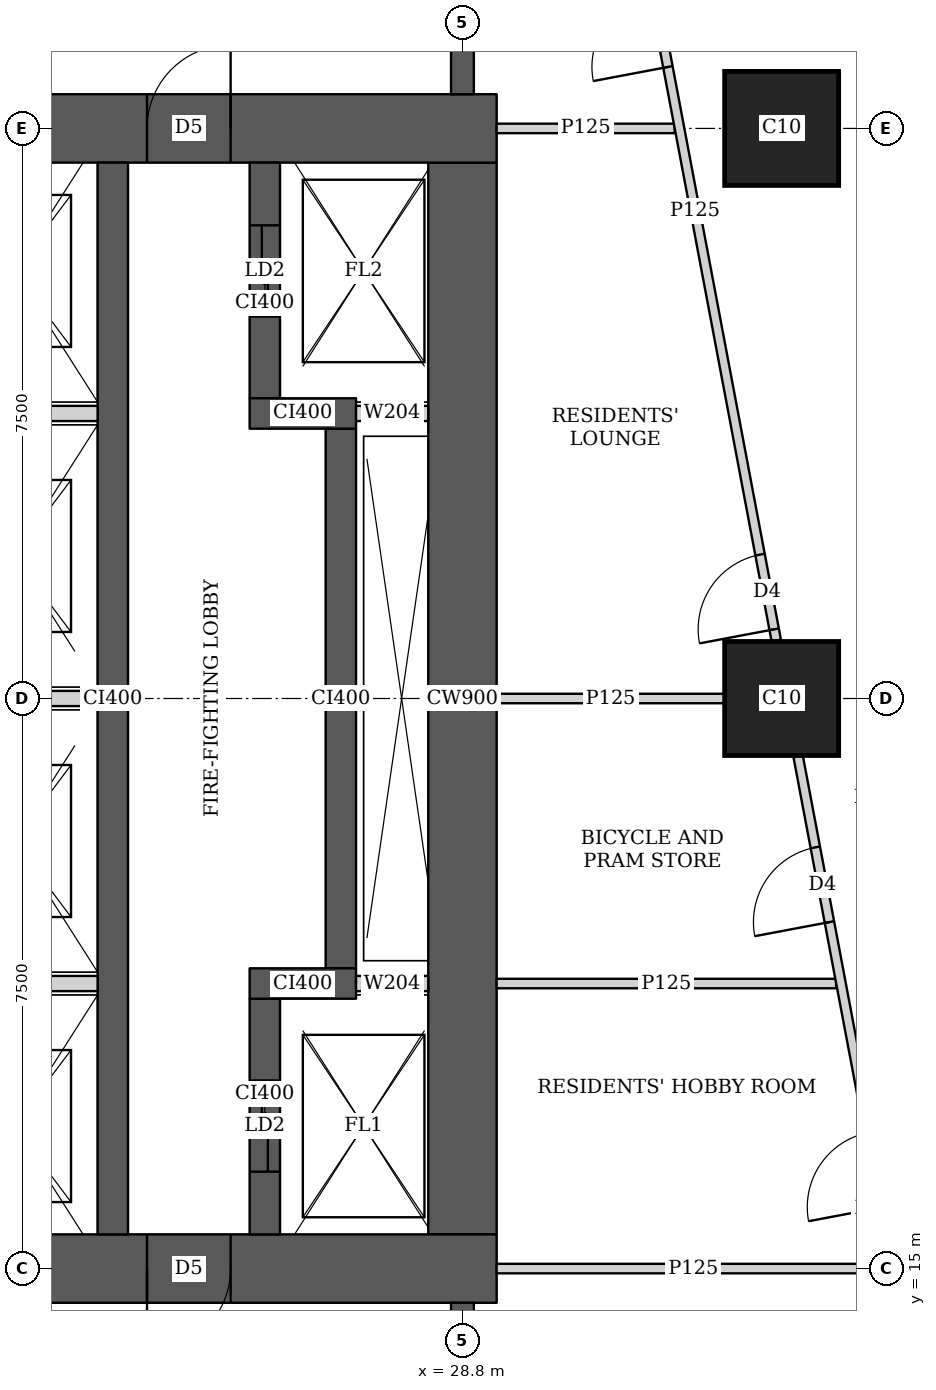
"""IFC4 building model, lengths in metres.
Left out: names, types, materials, properties, quantities, classifications, styles, units other than length and angle.
Written with IfcOpenShell. Run it as: python <this file> out.ifc"""

import sys

from ifc_helpers import new_model, si_unit, direction, frame, frame_2d, origin, origin_2d, place, context, subcontext, project, spatial, rectangle, extrude, element, fill, save


model = new_model("IFC4")
c1 = context("Model", 3, precision=1e-05, world=origin(), true_north=direction((0.0, 1.0)))
c2 = subcontext(c1, "Body", "Model", "MODEL_VIEW")
j1 = project(units=[si_unit("LENGTHUNIT", "METRE"), si_unit("PLANEANGLEUNIT", "RADIAN")], contexts=[c1])
p1 = place(None, origin())
s1 = spatial("IfcSite", under=j1, at=p1, CompositionType="ELEMENT")
p2 = place(p1, origin())
s2 = spatial("IfcBuilding", under=s1, at=p2, CompositionType="ELEMENT")
p3 = place(p2, frame((0.0, 0.0, 139.55)))
s3 = spatial("IfcBuildingStorey", under=s2, at=p3, CompositionType="ELEMENT", Elevation=139.55)
for number, where, z_axis, x_axis in (
    (1, (33.0, 22.5, 0.0), (0.0, 0.0, 1.0), (1.0, 0.0, 0.0)),
    (2, (33.0, 30.0, 0.0), (0.0, 0.0, 1.0), (1.0, 0.0, 0.0)),
):
    element("IfcColumn", number, at=place(p3, frame(where, z_axis=z_axis, x_axis=x_axis)), inside=s3, PredefinedType="COLUMN", context=c2, shape_type="SweptSolid", body=[
        extrude(rectangle(XDim=1.5, YDim=1.5, at=origin_2d()), origin(), (0.0, 0.0, 1.0), 3.75),
    ])
p4 = place(p3, frame((13.95, 15.0, 0.0), z_axis=(0.0, 0.0, 1.0), x_axis=(1.0, 0.0, 0.0)))
e3 = element("IfcWall", 3, at=p4, inside=s3, PredefinedType="SHEAR", context=c2, shape_type="SweptSolid", body=[
    extrude(rectangle(XDim=15.3, YDim=0.9, at=frame_2d((7.65, 0.0))), origin(), (0.0, 0.0, 1.0), 3.75),
])
p5 = place(p4, frame((4.45, 0.0, 0.0)))
e4 = element("IfcOpeningElement", 4, at=p5, cuts=e3, PredefinedType="OPENING", context=c2, shape_type="SweptSolid", body=[
    extrude(rectangle(XDim=1.8, YDim=2.1, at=frame_2d((0.9, 1.05))), frame((0.0, 0.46, 0.0), z_axis=(0.0, -1.0, 0.0), x_axis=(1.0, 0.0, 0.0)), (0.0, 0.0, 1.0), 0.92),
])
p6 = place(p4, frame((10.7, 0.0, 0.0)))
e5 = element("IfcOpeningElement", 5, at=p6, cuts=e3, PredefinedType="OPENING", context=c2, shape_type="SweptSolid", body=[
    extrude(rectangle(XDim=1.1, YDim=2.1, at=frame_2d((0.55, 1.05))), frame((0.0, 0.46, 0.0), z_axis=(0.0, -1.0, 0.0), x_axis=(1.0, 0.0, 0.0)), (0.0, 0.0, 1.0), 0.92),
])
p7 = place(p3, frame((13.95, 30.0, 0.0), z_axis=(0.0, 0.0, 1.0), x_axis=(1.0, 0.0, 0.0)))
e6 = element("IfcWall", 6, at=p7, inside=s3, PredefinedType="SHEAR", context=c2, shape_type="SweptSolid", body=[
    extrude(rectangle(XDim=15.3, YDim=0.9, at=frame_2d((7.65, 0.0))), origin(), (0.0, 0.0, 1.0), 3.75),
])
p8 = place(p7, frame((4.45, 0.0, 0.0)))
e7 = element("IfcOpeningElement", 7, at=p8, cuts=e6, PredefinedType="OPENING", context=c2, shape_type="SweptSolid", body=[
    extrude(rectangle(XDim=1.8, YDim=2.1, at=frame_2d((0.9, 1.05))), frame((0.0, 0.46, 0.0), z_axis=(0.0, -1.0, 0.0), x_axis=(1.0, 0.0, 0.0)), (0.0, 0.0, 1.0), 0.92),
])
p9 = place(p7, frame((10.7, 0.0, 0.0)))
e8 = element("IfcOpeningElement", 8, at=p9, cuts=e6, PredefinedType="OPENING", context=c2, shape_type="SweptSolid", body=[
    extrude(rectangle(XDim=1.1, YDim=2.1, at=frame_2d((0.55, 1.05))), frame((0.0, 0.46, 0.0), z_axis=(0.0, -1.0, 0.0), x_axis=(1.0, 0.0, 0.0)), (0.0, 0.0, 1.0), 0.92),
])
p10 = place(p3, frame((28.8, 15.45, 0.0), z_axis=(0.0, 0.0, 1.0), x_axis=(0.0, 1.0, 0.0)))
e9 = element("IfcWall", 9, at=p10, inside=s3, PredefinedType="SHEAR", context=c2, shape_type="SweptSolid", body=[
    extrude(rectangle(XDim=14.1, YDim=0.9, at=frame_2d((7.05, 0.0))), origin(), (0.0, 0.0, 1.0), 3.75),
])
p11 = place(p3, frame((24.2, 15.45, 0.0), z_axis=(0.0, 0.0, 1.0), x_axis=(0.0, 1.0, 0.0)))
e10 = element("IfcWall", 10, at=p11, inside=s3, PredefinedType="SHEAR", context=c2, shape_type="SweptSolid", body=[
    extrude(rectangle(XDim=14.1, YDim=0.4, at=frame_2d((7.05, 0.0))), origin(), (0.0, 0.0, 1.0), 3.75),
])
p12 = place(p3, frame((26.2, 15.45, 0.0), z_axis=(0.0, 0.0, 1.0), x_axis=(0.0, 1.0, 0.0)))
e11 = element("IfcWall", 11, at=p12, inside=s3, PredefinedType="SHEAR", context=c2, shape_type="SweptSolid", body=[
    extrude(rectangle(XDim=3.1, YDim=0.4, at=frame_2d((1.55, 0.0))), origin(), (0.0, 0.0, 1.0), 3.75),
])
p13 = place(p12, frame((0.825, 0.0, 0.0)))
e12 = element("IfcOpeningElement", 12, at=p13, cuts=e11, PredefinedType="OPENING", context=c2, shape_type="SweptSolid", body=[
    extrude(rectangle(XDim=1.2, YDim=2.1, at=frame_2d((0.6, 1.05))), frame((0.0, 0.21, 0.0), z_axis=(0.0, -1.0, 0.0), x_axis=(1.0, 0.0, 0.0)), (0.0, 0.0, 1.0), 0.42),
])
p14 = place(p3, frame((26.0, 18.75, 0.0), z_axis=(0.0, 0.0, 1.0), x_axis=(1.0, 0.0, 0.0)))
e13 = element("IfcWall", 13, at=p14, inside=s3, PredefinedType="SHEAR", context=c2, shape_type="SweptSolid", body=[
    extrude(rectangle(XDim=1.4, YDim=0.4, at=frame_2d((0.7, 0.0))), origin(), (0.0, 0.0, 1.0), 3.75),
])
p15 = place(p3, frame((27.2, 18.95, 0.0), z_axis=(0.0, 0.0, 1.0), x_axis=(0.0, 1.0, 0.0)))
e14 = element("IfcWall", 14, at=p15, inside=s3, PredefinedType="SHEAR", context=c2, shape_type="SweptSolid", body=[
    extrude(rectangle(XDim=7.1, YDim=0.4, at=frame_2d((3.55, 0.0))), origin(), (0.0, 0.0, 1.0), 3.75),
])
p16 = place(p3, frame((26.0, 26.25, 0.0), z_axis=(0.0, 0.0, 1.0), x_axis=(1.0, 0.0, 0.0)))
e15 = element("IfcWall", 15, at=p16, inside=s3, PredefinedType="SHEAR", context=c2, shape_type="SweptSolid", body=[
    extrude(rectangle(XDim=1.4, YDim=0.4, at=frame_2d((0.7, 0.0))), origin(), (0.0, 0.0, 1.0), 3.75),
])
p17 = place(p3, frame((26.2, 26.45, 0.0), z_axis=(0.0, 0.0, 1.0), x_axis=(0.0, 1.0, 0.0)))
e16 = element("IfcWall", 16, at=p17, inside=s3, PredefinedType="SHEAR", context=c2, shape_type="SweptSolid", body=[
    extrude(rectangle(XDim=3.1, YDim=0.4, at=frame_2d((1.55, 0.0))), origin(), (0.0, 0.0, 1.0), 3.75),
])
p18 = place(p17, frame((1.075, 0.0, 0.0)))
e17 = element("IfcOpeningElement", 17, at=p18, cuts=e16, PredefinedType="OPENING", context=c2, shape_type="SweptSolid", body=[
    extrude(rectangle(XDim=1.2, YDim=2.1, at=frame_2d((0.6, 1.05))), frame((0.0, 0.21, 0.0), z_axis=(0.0, -1.0, 0.0), x_axis=(1.0, 0.0, 0.0)), (0.0, 0.0, 1.0), 0.42),
])
for number, where, z_axis, x_axis in (
    (18, (28.8, 10.35, 0.0), (0.0, 0.0, 1.0), (0.0, 1.0, 0.0)),
    (19, (28.8, 30.45, 0.0), (0.0, 0.0, 1.0), (0.0, 1.0, 0.0)),
):
    element("IfcWall", number, at=place(p3, frame(where, z_axis=z_axis, x_axis=x_axis)), inside=s3, PredefinedType="SHEAR", context=c2, shape_type="SweptSolid", body=[
        extrude(rectangle(XDim=4.2, YDim=0.3, at=frame_2d((2.1, 0.0))), origin(), (0.0, 0.0, 1.0), 3.75),
    ])
p19 = place(p3, frame((33.623, 43.022, 0.0), z_axis=(0.0, 0.0, 1.0), x_axis=(0.185596841028, -0.98262597798, 0.0)))
e20 = element("IfcWall", 20, at=p19, inside=s3, PredefinedType="SOLIDWALL", context=c2, shape_type="SweptSolid", body=[
    extrude(rectangle(XDim=41.66, YDim=0.15, at=frame_2d((20.83, 0.0))), origin(), (0.0, 0.0, 1.0), 2.5),
])
p20 = place(p19, frame((20.242, 0.0, 0.0)))
e21 = element("IfcOpeningElement", 21, at=p20, cuts=e20, PredefinedType="OPENING", context=c2, shape_type="SweptSolid", body=[
    extrude(rectangle(XDim=1.0, YDim=2.1, at=frame_2d((0.5, 1.05))), frame((0.0, 0.085, 0.0), z_axis=(0.0, -1.0, 0.0), x_axis=(1.0, 0.0, 0.0)), (0.0, 0.0, 1.0), 0.17),
])
p21 = place(p19, frame((24.714, 0.0, 0.0)))
e22 = element("IfcOpeningElement", 22, at=p21, cuts=e20, PredefinedType="OPENING", context=c2, shape_type="SweptSolid", body=[
    extrude(rectangle(XDim=1.0, YDim=2.1, at=frame_2d((0.5, 1.05))), frame((0.0, 0.085, 0.0), z_axis=(0.0, -1.0, 0.0), x_axis=(1.0, 0.0, 0.0)), (0.0, 0.0, 1.0), 0.17),
])
p22 = place(p19, frame((31.206, 0.0, 0.0)))
e23 = element("IfcOpeningElement", 23, at=p22, cuts=e20, PredefinedType="OPENING", context=c2, shape_type="SweptSolid", body=[
    extrude(rectangle(XDim=1.0, YDim=2.1, at=frame_2d((0.5, 1.05))), frame((0.0, 0.085, 0.0), z_axis=(0.0, -1.0, 0.0), x_axis=(1.0, 0.0, 0.0)), (0.0, 0.0, 1.0), 0.17),
])
p23 = place(p3, frame((35.354, 10.424, 0.0), z_axis=(0.0, 0.0, 1.0), x_axis=(-0.185612234763, 0.982623070311, 0.0)))
e24 = element("IfcWall", 24, at=p23, inside=s3, PredefinedType="PARTITIONING", context=c2, shape_type="SweptSolid", body=[
    extrude(rectangle(XDim=11.513, YDim=0.125, at=frame_2d((5.756, 0.0))), origin(), (0.0, 0.0, 1.0), 3.5),
])
p24 = place(p23, frame((0.697, 0.0, 0.0)))
e25 = element("IfcOpeningElement", 25, at=p24, cuts=e24, PredefinedType="OPENING", context=c2, shape_type="SweptSolid", body=[
    extrude(rectangle(XDim=1.0, YDim=2.1, at=frame_2d((0.5, 1.05))), frame((0.0, 0.073, 0.0), z_axis=(0.0, -1.0, 0.0), x_axis=(1.0, 0.0, 0.0)), (0.0, 0.0, 1.0), 0.145),
])
p25 = place(p23, frame((5.48, 0.0, 0.0)))
e26 = element("IfcOpeningElement", 26, at=p25, cuts=e24, PredefinedType="OPENING", context=c2, shape_type="SweptSolid", body=[
    extrude(rectangle(XDim=1.0, YDim=2.1, at=frame_2d((0.5, 1.05))), frame((0.0, 0.073, 0.0), z_axis=(0.0, -1.0, 0.0), x_axis=(1.0, 0.0, 0.0)), (0.0, 0.0, 1.0), 0.145),
])
p26 = place(p23, frame((9.296, 0.0, 0.0)))
e27 = element("IfcOpeningElement", 27, at=p26, cuts=e24, PredefinedType="OPENING", context=c2, shape_type="SweptSolid", body=[
    extrude(rectangle(XDim=1.0, YDim=2.1, at=frame_2d((0.5, 1.05))), frame((0.0, 0.073, 0.0), z_axis=(0.0, -1.0, 0.0), x_axis=(1.0, 0.0, 0.0)), (0.0, 0.0, 1.0), 0.145),
])
p27 = place(p3, frame((32.929, 23.263, 0.0), z_axis=(0.0, 0.0, 1.0), x_axis=(-0.185612234763, 0.982623070311, 0.0)))
e28 = element("IfcWall", 28, at=p27, inside=s3, PredefinedType="PARTITIONING", context=c2, shape_type="SweptSolid", body=[
    extrude(rectangle(XDim=11.513, YDim=0.125, at=frame_2d((5.756, 0.0))), origin(), (0.0, 0.0, 1.0), 3.5),
])
p28 = place(p27, frame((0.15, 0.0, 0.0)))
e29 = element("IfcOpeningElement", 29, at=p28, cuts=e28, PredefinedType="OPENING", context=c2, shape_type="SweptSolid", body=[
    extrude(rectangle(XDim=1.0, YDim=2.1, at=frame_2d((0.5, 1.05))), frame((0.0, 0.073, 0.0), z_axis=(0.0, -1.0, 0.0), x_axis=(1.0, 0.0, 0.0)), (0.0, 0.0, 1.0), 0.145),
])
p29 = place(p27, frame((7.679, 0.0, 0.0)))
e30 = element("IfcOpeningElement", 30, at=p29, cuts=e28, PredefinedType="OPENING", context=c2, shape_type="SweptSolid", body=[
    extrude(rectangle(XDim=1.0, YDim=2.1, at=frame_2d((0.5, 1.05))), frame((0.0, 0.073, 0.0), z_axis=(0.0, -1.0, 0.0), x_axis=(1.0, 0.0, 0.0)), (0.0, 0.0, 1.0), 0.145),
])
p30 = place(p3, frame((29.25, 15.0, 0.0), z_axis=(0.0, 0.0, 1.0), x_axis=(1.0, 0.0, 0.0)))
e31 = element("IfcWall", 31, at=p30, inside=s3, PredefinedType="PARTITIONING", context=c2, shape_type="SweptSolid", body=[
    extrude(rectangle(XDim=5.176, YDim=0.125, at=frame_2d((2.588, 0.0))), origin(), (0.0, 0.0, 1.0), 3.5),
])
p31 = place(p3, frame((29.25, 18.75, 0.0), z_axis=(0.0, 0.0, 1.0), x_axis=(1.0, 0.0, 0.0)))
e32 = element("IfcWall", 32, at=p31, inside=s3, PredefinedType="PARTITIONING", context=c2, shape_type="SweptSolid", body=[
    extrude(rectangle(XDim=4.467, YDim=0.125, at=frame_2d((2.233, 0.0))), origin(), (0.0, 0.0, 1.0), 3.5),
])
p32 = place(p3, frame((29.25, 22.5, 0.0), z_axis=(0.0, 0.0, 1.0), x_axis=(1.0, 0.0, 0.0)))
e33 = element("IfcWall", 33, at=p32, inside=s3, PredefinedType="PARTITIONING", context=c2, shape_type="SweptSolid", body=[
    extrude(rectangle(XDim=2.999, YDim=0.125, at=frame_2d((1.5, 0.0))), origin(), (0.0, 0.0, 1.0), 3.5),
])
p33 = place(p3, frame((29.25, 30.0, 0.0), z_axis=(0.0, 0.0, 1.0), x_axis=(1.0, 0.0, 0.0)))
e34 = element("IfcWall", 34, at=p33, inside=s3, PredefinedType="PARTITIONING", context=c2, shape_type="SweptSolid", body=[
    extrude(rectangle(XDim=2.342, YDim=0.125, at=frame_2d((1.171, 0.0))), origin(), (0.0, 0.0, 1.0), 3.5),
])
for number, where, z_axis, x_axis in (
    (35, (21.8, 18.75, 0.0), (0.0, 0.0, 1.0), (1.0, 0.0, 0.0)),
    (36, (21.8, 22.5, 0.0), (0.0, 0.0, 1.0), (1.0, 0.0, 0.0)),
    (37, (21.8, 26.25, 0.0), (0.0, 0.0, 1.0), (1.0, 0.0, 0.0)),
):
    element("IfcWall", number, at=place(p3, frame(where, z_axis=z_axis, x_axis=x_axis)), inside=s3, PredefinedType="SOLIDWALL", context=c2, shape_type="SweptSolid", body=[
        extrude(rectangle(XDim=2.2, YDim=0.2, at=frame_2d((1.1, 0.0))), origin(), (0.0, 0.0, 1.0), 3.5),
    ])
for number, where, z_axis, x_axis in (
    (38, (27.4, 18.75, 0.0), (0.0, 0.0, 1.0), (1.0, 0.0, 0.0)),
    (39, (27.4, 26.25, 0.0), (0.0, 0.0, 1.0), (1.0, 0.0, 0.0)),
):
    element("IfcWall", number, at=place(p3, frame(where, z_axis=z_axis, x_axis=x_axis)), inside=s3, PredefinedType="SOLIDWALL", context=c2, shape_type="SweptSolid", body=[
        extrude(rectangle(XDim=0.95, YDim=0.2, at=frame_2d((0.475, 0.0))), origin(), (0.0, 0.0, 1.0), 3.5),
    ])
p34 = place(p26, origin())
e40 = element("IfcDoor", 40, at=p34, inside=s3, OperationType="SINGLE_SWING_LEFT", PredefinedType="DOOR", context=c2, shape_type="SweptSolid", body=[
    extrude(rectangle(XDim=1.0, YDim=2.1, at=frame_2d((0.5, 1.05))), frame((0.0, 0.025, 0.0), z_axis=(0.0, -1.0, 0.0), x_axis=(1.0, 0.0, 0.0)), (0.0, 0.0, 1.0), 0.05),
])
fill(e27, e40)
p35 = place(p28, origin())
e41 = element("IfcDoor", 41, at=p35, inside=s3, OperationType="SINGLE_SWING_LEFT", PredefinedType="DOOR", context=c2, shape_type="SweptSolid", body=[
    extrude(rectangle(XDim=1.0, YDim=2.1, at=frame_2d((0.5, 1.05))), frame((0.0, 0.025, 0.0), z_axis=(0.0, -1.0, 0.0), x_axis=(1.0, 0.0, 0.0)), (0.0, 0.0, 1.0), 0.05),
])
fill(e29, e41)
p36 = place(p29, origin())
e42 = element("IfcDoor", 42, at=p36, inside=s3, OperationType="SINGLE_SWING_LEFT", PredefinedType="DOOR", context=c2, shape_type="SweptSolid", body=[
    extrude(rectangle(XDim=1.0, YDim=2.1, at=frame_2d((0.5, 1.05))), frame((0.0, 0.025, 0.0), z_axis=(0.0, -1.0, 0.0), x_axis=(1.0, 0.0, 0.0)), (0.0, 0.0, 1.0), 0.05),
])
fill(e30, e42)
p37 = place(p6, origin())
e43 = element("IfcDoor", 43, at=p37, inside=s3, OperationType="SINGLE_SWING_RIGHT", PredefinedType="DOOR", context=c2, shape_type="SweptSolid", body=[
    extrude(rectangle(XDim=1.1, YDim=2.1, at=frame_2d((0.55, 1.05))), frame((0.0, 0.025, 0.0), z_axis=(0.0, -1.0, 0.0), x_axis=(1.0, 0.0, 0.0)), (0.0, 0.0, 1.0), 0.05),
])
fill(e5, e43)
p38 = place(p9, origin())
e44 = element("IfcDoor", 44, at=p38, inside=s3, OperationType="SINGLE_SWING_RIGHT", PredefinedType="DOOR", context=c2, shape_type="SweptSolid", body=[
    extrude(rectangle(XDim=1.1, YDim=2.1, at=frame_2d((0.55, 1.05))), frame((0.0, 0.025, 0.0), z_axis=(0.0, -1.0, 0.0), x_axis=(1.0, 0.0, 0.0)), (0.0, 0.0, 1.0), 0.05),
])
fill(e8, e44)
p39 = place(p13, origin())
e45 = element("IfcDoor", 45, at=p39, inside=s3, OperationType="DOUBLE_DOOR_SLIDING", PredefinedType="DOOR", context=c2, shape_type="SweptSolid", body=[
    extrude(rectangle(XDim=1.2, YDim=2.1, at=frame_2d((0.6, 1.05))), frame((0.0, 0.025, 0.0), z_axis=(0.0, -1.0, 0.0), x_axis=(1.0, 0.0, 0.0)), (0.0, 0.0, 1.0), 0.05),
])
fill(e12, e45)
p40 = place(p18, origin())
e46 = element("IfcDoor", 46, at=p40, inside=s3, OperationType="DOUBLE_DOOR_SLIDING", PredefinedType="DOOR", context=c2, shape_type="SweptSolid", body=[
    extrude(rectangle(XDim=1.2, YDim=2.1, at=frame_2d((0.6, 1.05))), frame((0.0, 0.025, 0.0), z_axis=(0.0, -1.0, 0.0), x_axis=(1.0, 0.0, 0.0)), (0.0, 0.0, 1.0), 0.05),
])
fill(e17, e46)
save(model, sys.argv[1])
